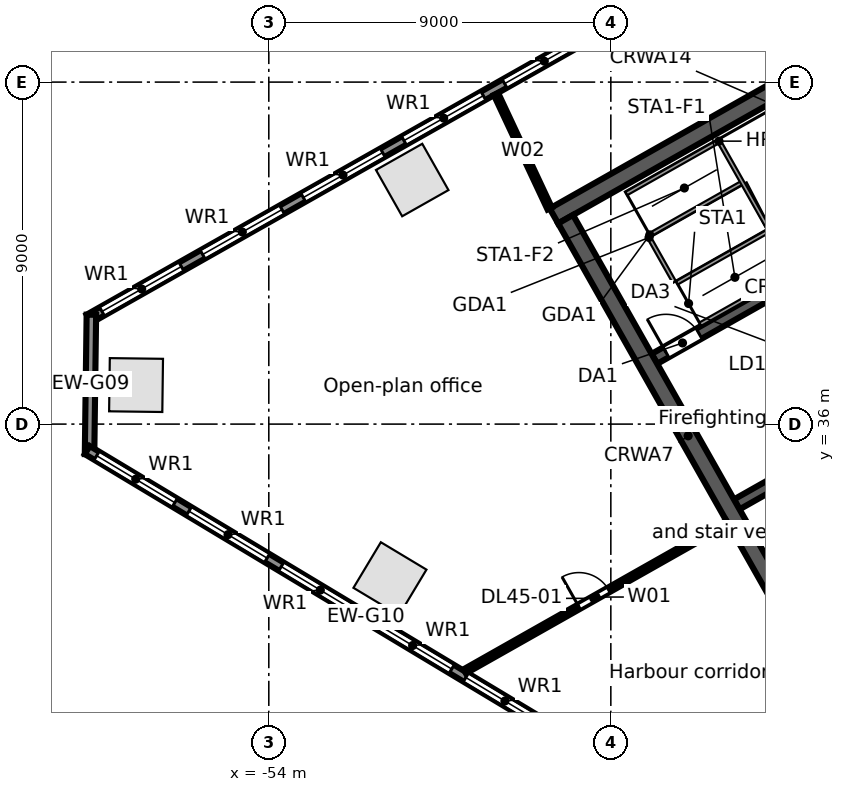
"""IFC4 building model, lengths in metres.
Left out: names, types, materials, properties, quantities, classifications, styles, units other than length and angle.
Written with IfcOpenShell. Run it as: python <this file> out.ifc"""

import sys

from ifc_helpers import new_model, si_unit, direction, frame, frame_2d, origin, origin_2d, place, context, subcontext, project, spatial, rectangle, extrude, element, fill, save


model = new_model("IFC4")
c1 = context("Model", 3, precision=1e-05, world=origin(), true_north=direction((0.0, 1.0)))
c2 = subcontext(c1, "Body", "Model", "MODEL_VIEW")
j1 = project(units=[si_unit("LENGTHUNIT", "METRE"), si_unit("PLANEANGLEUNIT", "RADIAN")], contexts=[c1])
p1 = place(None, origin())
s1 = spatial("IfcSite", under=j1, at=p1, CompositionType="ELEMENT")
p2 = place(p1, origin())
s2 = spatial("IfcBuilding", under=s1, at=p2, CompositionType="ELEMENT")
p3 = place(p2, frame((0.0, 0.0, 211.4)))
s3 = spatial("IfcBuildingStorey", under=s2, at=p3, CompositionType="ELEMENT", Elevation=211.4)
for number, where, z_axis, x_axis in (
    (1, (-50.226, 42.423, 0.0), (0.0, 0.0, 1.0), (-0.87, -0.492, 0.0)),
    (2, (-57.493, 37.027, 0.0), (0.0, 0.0, 1.0), (-0.013, -1.0, 0.0)),
    (3, (-50.812, 31.931, 0.0), (0.0, 0.0, 1.0), (0.857, -0.515, 0.0)),
):
    element("IfcColumn", number, at=place(p3, frame(where, z_axis=z_axis, x_axis=x_axis)), inside=s3, PredefinedType="COLUMN", context=c2, shape_type="SweptSolid", body=[
        extrude(rectangle(XDim=1.4, YDim=1.4, at=origin_2d()), origin(), (0.0, 0.0, 1.0), 3.9),
    ])
p4 = place(p3, frame((-58.732, 38.771, 0.0), z_axis=(0.0, 0.0, 1.0), x_axis=(0.870354824205, 0.492425100887, 0.0)))
e4 = element("IfcWall", 4, at=p4, inside=s3, PredefinedType="STANDARD", context=c2, shape_type="SweptSolid", body=[
    extrude(rectangle(XDim=64.006, YDim=0.25, at=frame_2d((32.003, 0.0))), origin(), (0.0, 0.0, 1.0), 3.62),
])
p5 = place(p4, frame((61.259, 0.0, 0.8)))
e5 = element("IfcOpeningElement", 5, at=p5, cuts=e4, PredefinedType="OPENING", context=c2, shape_type="SweptSolid", body=[
    extrude(rectangle(XDim=2.4, YDim=2.2, at=frame_2d((1.2, 1.1))), frame((0.0, 0.135, 0.0), z_axis=(0.0, -1.0, 0.0), x_axis=(1.0, 0.0, 0.0)), (0.0, 0.0, 1.0), 0.27),
])
p6 = place(p4, frame((58.216, 0.0, 0.8)))
e6 = element("IfcOpeningElement", 6, at=p6, cuts=e4, PredefinedType="OPENING", context=c2, shape_type="SweptSolid", body=[
    extrude(rectangle(XDim=2.4, YDim=2.2, at=frame_2d((1.2, 1.1))), frame((0.0, 0.135, 0.0), z_axis=(0.0, -1.0, 0.0), x_axis=(1.0, 0.0, 0.0)), (0.0, 0.0, 1.0), 0.27),
])
p7 = place(p4, frame((55.173, 0.0, 0.8)))
e7 = element("IfcOpeningElement", 7, at=p7, cuts=e4, PredefinedType="OPENING", context=c2, shape_type="SweptSolid", body=[
    extrude(rectangle(XDim=2.4, YDim=2.2, at=frame_2d((1.2, 1.1))), frame((0.0, 0.135, 0.0), z_axis=(0.0, -1.0, 0.0), x_axis=(1.0, 0.0, 0.0)), (0.0, 0.0, 1.0), 0.27),
])
p8 = place(p4, frame((52.129, 0.0, 0.8)))
e8 = element("IfcOpeningElement", 8, at=p8, cuts=e4, PredefinedType="OPENING", context=c2, shape_type="SweptSolid", body=[
    extrude(rectangle(XDim=2.4, YDim=2.2, at=frame_2d((1.2, 1.1))), frame((0.0, 0.135, 0.0), z_axis=(0.0, -1.0, 0.0), x_axis=(1.0, 0.0, 0.0)), (0.0, 0.0, 1.0), 0.27),
])
p9 = place(p4, frame((49.086, 0.0, 0.8)))
e9 = element("IfcOpeningElement", 9, at=p9, cuts=e4, PredefinedType="OPENING", context=c2, shape_type="SweptSolid", body=[
    extrude(rectangle(XDim=2.4, YDim=2.2, at=frame_2d((1.2, 1.1))), frame((0.0, 0.135, 0.0), z_axis=(0.0, -1.0, 0.0), x_axis=(1.0, 0.0, 0.0)), (0.0, 0.0, 1.0), 0.27),
])
p10 = place(p4, frame((46.043, 0.0, 0.8)))
e10 = element("IfcOpeningElement", 10, at=p10, cuts=e4, PredefinedType="OPENING", context=c2, shape_type="SweptSolid", body=[
    extrude(rectangle(XDim=2.4, YDim=2.2, at=frame_2d((1.2, 1.1))), frame((0.0, 0.135, 0.0), z_axis=(0.0, -1.0, 0.0), x_axis=(1.0, 0.0, 0.0)), (0.0, 0.0, 1.0), 0.27),
])
p11 = place(p4, frame((43.0, 0.0, 0.8)))
e11 = element("IfcOpeningElement", 11, at=p11, cuts=e4, PredefinedType="OPENING", context=c2, shape_type="SweptSolid", body=[
    extrude(rectangle(XDim=2.4, YDim=2.2, at=frame_2d((1.2, 1.1))), frame((0.0, 0.135, 0.0), z_axis=(0.0, -1.0, 0.0), x_axis=(1.0, 0.0, 0.0)), (0.0, 0.0, 1.0), 0.27),
])
p12 = place(p4, frame((39.956, 0.0, 0.8)))
e12 = element("IfcOpeningElement", 12, at=p12, cuts=e4, PredefinedType="OPENING", context=c2, shape_type="SweptSolid", body=[
    extrude(rectangle(XDim=2.4, YDim=2.2, at=frame_2d((1.2, 1.1))), frame((0.0, 0.135, 0.0), z_axis=(0.0, -1.0, 0.0), x_axis=(1.0, 0.0, 0.0)), (0.0, 0.0, 1.0), 0.27),
])
p13 = place(p4, frame((36.913, 0.0, 0.8)))
e13 = element("IfcOpeningElement", 13, at=p13, cuts=e4, PredefinedType="OPENING", context=c2, shape_type="SweptSolid", body=[
    extrude(rectangle(XDim=2.4, YDim=2.2, at=frame_2d((1.2, 1.1))), frame((0.0, 0.135, 0.0), z_axis=(0.0, -1.0, 0.0), x_axis=(1.0, 0.0, 0.0)), (0.0, 0.0, 1.0), 0.27),
])
p14 = place(p4, frame((33.87, 0.0, 0.8)))
e14 = element("IfcOpeningElement", 14, at=p14, cuts=e4, PredefinedType="OPENING", context=c2, shape_type="SweptSolid", body=[
    extrude(rectangle(XDim=2.4, YDim=2.2, at=frame_2d((1.2, 1.1))), frame((0.0, 0.135, 0.0), z_axis=(0.0, -1.0, 0.0), x_axis=(1.0, 0.0, 0.0)), (0.0, 0.0, 1.0), 0.27),
])
p15 = place(p4, frame((30.826, 0.0, 0.8)))
e15 = element("IfcOpeningElement", 15, at=p15, cuts=e4, PredefinedType="OPENING", context=c2, shape_type="SweptSolid", body=[
    extrude(rectangle(XDim=2.4, YDim=2.2, at=frame_2d((1.2, 1.1))), frame((0.0, 0.135, 0.0), z_axis=(0.0, -1.0, 0.0), x_axis=(1.0, 0.0, 0.0)), (0.0, 0.0, 1.0), 0.27),
])
p16 = place(p4, frame((27.783, 0.0, 0.8)))
e16 = element("IfcOpeningElement", 16, at=p16, cuts=e4, PredefinedType="OPENING", context=c2, shape_type="SweptSolid", body=[
    extrude(rectangle(XDim=2.4, YDim=2.2, at=frame_2d((1.2, 1.1))), frame((0.0, 0.135, 0.0), z_axis=(0.0, -1.0, 0.0), x_axis=(1.0, 0.0, 0.0)), (0.0, 0.0, 1.0), 0.27),
])
p17 = place(p4, frame((24.74, 0.0, 0.8)))
e17 = element("IfcOpeningElement", 17, at=p17, cuts=e4, PredefinedType="OPENING", context=c2, shape_type="SweptSolid", body=[
    extrude(rectangle(XDim=2.4, YDim=2.2, at=frame_2d((1.2, 1.1))), frame((0.0, 0.135, 0.0), z_axis=(0.0, -1.0, 0.0), x_axis=(1.0, 0.0, 0.0)), (0.0, 0.0, 1.0), 0.27),
])
p18 = place(p4, frame((21.696, 0.0, 0.8)))
e18 = element("IfcOpeningElement", 18, at=p18, cuts=e4, PredefinedType="OPENING", context=c2, shape_type="SweptSolid", body=[
    extrude(rectangle(XDim=2.4, YDim=2.2, at=frame_2d((1.2, 1.1))), frame((0.0, 0.135, 0.0), z_axis=(0.0, -1.0, 0.0), x_axis=(1.0, 0.0, 0.0)), (0.0, 0.0, 1.0), 0.27),
])
p19 = place(p4, frame((18.653, 0.0, 0.8)))
e19 = element("IfcOpeningElement", 19, at=p19, cuts=e4, PredefinedType="OPENING", context=c2, shape_type="SweptSolid", body=[
    extrude(rectangle(XDim=2.4, YDim=2.2, at=frame_2d((1.2, 1.1))), frame((0.0, 0.135, 0.0), z_axis=(0.0, -1.0, 0.0), x_axis=(1.0, 0.0, 0.0)), (0.0, 0.0, 1.0), 0.27),
])
p20 = place(p4, frame((15.61, 0.0, 0.8)))
e20 = element("IfcOpeningElement", 20, at=p20, cuts=e4, PredefinedType="OPENING", context=c2, shape_type="SweptSolid", body=[
    extrude(rectangle(XDim=2.4, YDim=2.2, at=frame_2d((1.2, 1.1))), frame((0.0, 0.135, 0.0), z_axis=(0.0, -1.0, 0.0), x_axis=(1.0, 0.0, 0.0)), (0.0, 0.0, 1.0), 0.27),
])
p21 = place(p4, frame((12.567, 0.0, 0.8)))
e21 = element("IfcOpeningElement", 21, at=p21, cuts=e4, PredefinedType="OPENING", context=c2, shape_type="SweptSolid", body=[
    extrude(rectangle(XDim=2.4, YDim=2.2, at=frame_2d((1.2, 1.1))), frame((0.0, 0.135, 0.0), z_axis=(0.0, -1.0, 0.0), x_axis=(1.0, 0.0, 0.0)), (0.0, 0.0, 1.0), 0.27),
])
p22 = place(p4, frame((9.523, 0.0, 0.8)))
e22 = element("IfcOpeningElement", 22, at=p22, cuts=e4, PredefinedType="OPENING", context=c2, shape_type="SweptSolid", body=[
    extrude(rectangle(XDim=2.4, YDim=2.2, at=frame_2d((1.2, 1.1))), frame((0.0, 0.135, 0.0), z_axis=(0.0, -1.0, 0.0), x_axis=(1.0, 0.0, 0.0)), (0.0, 0.0, 1.0), 0.27),
])
p23 = place(p4, frame((6.48, 0.0, 0.8)))
e23 = element("IfcOpeningElement", 23, at=p23, cuts=e4, PredefinedType="OPENING", context=c2, shape_type="SweptSolid", body=[
    extrude(rectangle(XDim=2.4, YDim=2.2, at=frame_2d((1.2, 1.1))), frame((0.0, 0.135, 0.0), z_axis=(0.0, -1.0, 0.0), x_axis=(1.0, 0.0, 0.0)), (0.0, 0.0, 1.0), 0.27),
])
p24 = place(p4, frame((3.437, 0.0, 0.8)))
e24 = element("IfcOpeningElement", 24, at=p24, cuts=e4, PredefinedType="OPENING", context=c2, shape_type="SweptSolid", body=[
    extrude(rectangle(XDim=2.4, YDim=2.2, at=frame_2d((1.2, 1.1))), frame((0.0, 0.135, 0.0), z_axis=(0.0, -1.0, 0.0), x_axis=(1.0, 0.0, 0.0)), (0.0, 0.0, 1.0), 0.27),
])
p25 = place(p4, frame((0.393, 0.0, 0.8)))
e25 = element("IfcOpeningElement", 25, at=p25, cuts=e4, PredefinedType="OPENING", context=c2, shape_type="SweptSolid", body=[
    extrude(rectangle(XDim=2.4, YDim=2.2, at=frame_2d((1.2, 1.1))), frame((0.0, 0.135, 0.0), z_axis=(0.0, -1.0, 0.0), x_axis=(1.0, 0.0, 0.0)), (0.0, 0.0, 1.0), 0.27),
])
p26 = place(p3, frame((-58.717, 35.208, 0.0), z_axis=(0.0, 0.0, 1.0), x_axis=(0.01310512158, 0.999914124207, 0.0)))
e26 = element("IfcWall", 26, at=p26, inside=s3, PredefinedType="STANDARD", context=c2, shape_type="SweptSolid", body=[
    extrude(rectangle(XDim=3.67, YDim=0.25, at=frame_2d((1.835, 0.0))), origin(), (0.0, 0.0, 1.0), 3.62),
])
p27 = place(p3, frame((-44.115, 26.507, 0.0), z_axis=(0.0, 0.0, 1.0), x_axis=(-0.857166583633, 0.515039268311, 0.0)))
e27 = element("IfcWall", 27, at=p27, inside=s3, PredefinedType="STANDARD", context=c2, shape_type="SweptSolid", body=[
    extrude(rectangle(XDim=17.106, YDim=0.25, at=frame_2d((8.553, 0.0))), origin(), (0.0, 0.0, 1.0), 3.62),
])
p28 = place(p27, frame((14.417, 0.0, 0.8)))
e28 = element("IfcOpeningElement", 28, at=p28, cuts=e27, PredefinedType="OPENING", context=c2, shape_type="SweptSolid", body=[
    extrude(rectangle(XDim=2.4, YDim=2.2, at=frame_2d((1.2, 1.1))), frame((0.0, 0.135, 0.0), z_axis=(0.0, -1.0, 0.0), x_axis=(1.0, 0.0, 0.0)), (0.0, 0.0, 1.0), 0.27),
])
p29 = place(p27, frame((11.584, 0.0, 0.8)))
e29 = element("IfcOpeningElement", 29, at=p29, cuts=e27, PredefinedType="OPENING", context=c2, shape_type="SweptSolid", body=[
    extrude(rectangle(XDim=2.4, YDim=2.2, at=frame_2d((1.2, 1.1))), frame((0.0, 0.135, 0.0), z_axis=(0.0, -1.0, 0.0), x_axis=(1.0, 0.0, 0.0)), (0.0, 0.0, 1.0), 0.27),
])
p30 = place(p27, frame((8.75, 0.0, 0.8)))
e30 = element("IfcOpeningElement", 30, at=p30, cuts=e27, PredefinedType="OPENING", context=c2, shape_type="SweptSolid", body=[
    extrude(rectangle(XDim=2.4, YDim=2.2, at=frame_2d((1.2, 1.1))), frame((0.0, 0.135, 0.0), z_axis=(0.0, -1.0, 0.0), x_axis=(1.0, 0.0, 0.0)), (0.0, 0.0, 1.0), 0.27),
])
p31 = place(p27, frame((5.917, 0.0, 0.8)))
e31 = element("IfcOpeningElement", 31, at=p31, cuts=e27, PredefinedType="OPENING", context=c2, shape_type="SweptSolid", body=[
    extrude(rectangle(XDim=2.4, YDim=2.2, at=frame_2d((1.2, 1.1))), frame((0.0, 0.135, 0.0), z_axis=(0.0, -1.0, 0.0), x_axis=(1.0, 0.0, 0.0)), (0.0, 0.0, 1.0), 0.27),
])
p32 = place(p27, frame((3.084, 0.0, 0.8)))
e32 = element("IfcOpeningElement", 32, at=p32, cuts=e27, PredefinedType="OPENING", context=c2, shape_type="SweptSolid", body=[
    extrude(rectangle(XDim=2.4, YDim=2.2, at=frame_2d((1.2, 1.1))), frame((0.0, 0.135, 0.0), z_axis=(0.0, -1.0, 0.0), x_axis=(1.0, 0.0, 0.0)), (0.0, 0.0, 1.0), 0.27),
])
p33 = place(p27, frame((0.25, 0.0, 0.8)))
e33 = element("IfcOpeningElement", 33, at=p33, cuts=e27, PredefinedType="OPENING", context=c2, shape_type="SweptSolid", body=[
    extrude(rectangle(XDim=2.4, YDim=2.2, at=frame_2d((1.2, 1.1))), frame((0.0, 0.135, 0.0), z_axis=(0.0, -1.0, 0.0), x_axis=(1.0, 0.0, 0.0)), (0.0, 0.0, 1.0), 0.27),
])
p34 = place(p3, frame((-41.687, 33.887, 0.0), z_axis=(0.0, 0.0, 1.0), x_axis=(0.870355736587, 0.49242348826, 0.0)))
e34 = element("IfcWall", 34, at=p34, inside=s3, PredefinedType="SOLIDWALL", context=c2, shape_type="SweptSolid", body=[
    extrude(rectangle(XDim=6.15, YDim=0.3, at=frame_2d((3.075, 0.0))), origin(), (0.0, 0.0, 1.0), 3.62),
])
p35 = place(p34, frame((1.25, 0.0, 0.0)))
e35 = element("IfcOpeningElement", 35, at=p35, cuts=e34, PredefinedType="OPENING", context=c2, shape_type="SweptSolid", body=[
    extrude(rectangle(XDim=1.1, YDim=2.1, at=frame_2d((0.55, 1.05))), frame((0.0, 0.16, 0.0), z_axis=(0.0, -1.0, 0.0), x_axis=(1.0, 0.0, 0.0)), (0.0, 0.0, 1.0), 0.32),
])
p36 = place(p34, frame((4.4, 0.0, 0.0)))
e36 = element("IfcOpeningElement", 36, at=p36, cuts=e34, PredefinedType="OPENING", context=c2, shape_type="SweptSolid", body=[
    extrude(rectangle(XDim=1.1, YDim=2.1, at=frame_2d((0.55, 1.05))), frame((0.0, 0.16, 0.0), z_axis=(0.0, -1.0, 0.0), x_axis=(1.0, 0.0, 0.0)), (0.0, 0.0, 1.0), 0.32),
])
p37 = place(p3, frame((-43.853, 37.717, 0.0), z_axis=(0.0, 0.0, 1.0), x_axis=(0.870360409231, 0.492415229297, 0.0)))
e37 = element("IfcWall", 37, at=p37, inside=s3, PredefinedType="SOLIDWALL", context=c2, shape_type="SweptSolid", body=[
    extrude(rectangle(XDim=7.55, YDim=0.3, at=frame_2d((3.775, 0.0))), origin(), (0.0, 0.0, 1.0), 3.62),
])
p38 = place(p37, frame((0.35, 0.0, 0.0)))
e38 = element("IfcOpeningElement", 38, at=p38, cuts=e37, PredefinedType="OPENING", context=c2, shape_type="SweptSolid", body=[
    extrude(rectangle(XDim=1.0, YDim=2.1, at=frame_2d((0.5, 1.05))), frame((0.0, 0.16, 0.0), z_axis=(0.0, -1.0, 0.0), x_axis=(1.0, 0.0, 0.0)), (0.0, 0.0, 1.0), 0.32),
])
p39 = place(p3, frame((-46.498, 41.477, 0.0), z_axis=(0.0, 0.0, 1.0), x_axis=(0.870359753402, 0.492416388494, 0.0)))
e39 = element("IfcWall", 39, at=p39, inside=s3, PredefinedType="SOLIDWALL", context=c2, shape_type="SweptSolid", body=[
    extrude(rectangle(XDim=17.0, YDim=0.45, at=frame_2d((8.5, 0.0))), origin(), (0.0, 0.0, 1.0), 3.62),
])
p40 = place(p3, frame((-46.191, 41.392, 0.0), z_axis=(0.0, 0.0, 1.0), x_axis=(0.492421378713, -0.870356930107, 0.0)))
e40 = element("IfcWall", 40, at=p40, inside=s3, PredefinedType="SOLIDWALL", context=c2, shape_type="SweptSolid", body=[
    extrude(rectangle(XDim=13.1, YDim=0.45, at=frame_2d((6.55, 0.0))), origin(), (0.0, 0.0, 1.0), 3.62),
])
p41 = place(p3, frame((-48.843, 29.494, 0.0), z_axis=(0.0, 0.0, 1.0), x_axis=(0.870384139606, 0.492373282705, 0.0)))
e41 = element("IfcWall", 41, at=p41, inside=s3, PredefinedType="PARTITIONING", context=c2, shape_type="SweptSolid", body=[
    extrude(rectangle(XDim=7.941, YDim=0.125, at=frame_2d((3.971, 0.0))), origin(), (0.0, 0.0, 1.0), 2.9),
])
p42 = place(p41, frame((3.45, 0.0, 0.0)))
e42 = element("IfcOpeningElement", 42, at=p42, cuts=e41, PredefinedType="OPENING", context=c2, shape_type="SweptSolid", body=[
    extrude(rectangle(XDim=0.9, YDim=2.1, at=frame_2d((0.45, 1.05))), frame((0.0, 0.073, 0.0), z_axis=(0.0, -1.0, 0.0), x_axis=(1.0, 0.0, 0.0)), (0.0, 0.0, 1.0), 0.145),
])
p43 = place(p3, frame((-48.022, 44.687, 0.0), z_axis=(0.0, 0.0, 1.0), x_axis=(0.424510917438, -0.905422818895, 0.0)))
e43 = element("IfcWall", 43, at=p43, inside=s3, PredefinedType="PARTITIONING", context=c2, shape_type="SweptSolid", body=[
    extrude(rectangle(XDim=3.329, YDim=0.125, at=frame_2d((1.665, 0.0))), origin(), (0.0, 0.0, 1.0), 2.988),
])
p44 = place(p21, origin())
e44 = element("IfcWindow", 44, at=p44, inside=s3, PartitioningType="SINGLE_PANEL", PredefinedType="WINDOW", context=c2, shape_type="SweptSolid", body=[
    extrude(rectangle(XDim=2.4, YDim=2.2, at=frame_2d((1.2, 1.1))), frame((0.0, 0.03, 0.0), z_axis=(0.0, -1.0, 0.0), x_axis=(1.0, 0.0, 0.0)), (0.0, 0.0, 1.0), 0.06),
])
fill(e21, e44)
p45 = place(p22, origin())
e45 = element("IfcWindow", 45, at=p45, inside=s3, PartitioningType="SINGLE_PANEL", PredefinedType="WINDOW", context=c2, shape_type="SweptSolid", body=[
    extrude(rectangle(XDim=2.4, YDim=2.2, at=frame_2d((1.2, 1.1))), frame((0.0, 0.03, 0.0), z_axis=(0.0, -1.0, 0.0), x_axis=(1.0, 0.0, 0.0)), (0.0, 0.0, 1.0), 0.06),
])
fill(e22, e45)
p46 = place(p23, origin())
e46 = element("IfcWindow", 46, at=p46, inside=s3, PartitioningType="SINGLE_PANEL", PredefinedType="WINDOW", context=c2, shape_type="SweptSolid", body=[
    extrude(rectangle(XDim=2.4, YDim=2.2, at=frame_2d((1.2, 1.1))), frame((0.0, 0.03, 0.0), z_axis=(0.0, -1.0, 0.0), x_axis=(1.0, 0.0, 0.0)), (0.0, 0.0, 1.0), 0.06),
])
fill(e23, e46)
p47 = place(p24, origin())
e47 = element("IfcWindow", 47, at=p47, inside=s3, PartitioningType="SINGLE_PANEL", PredefinedType="WINDOW", context=c2, shape_type="SweptSolid", body=[
    extrude(rectangle(XDim=2.4, YDim=2.2, at=frame_2d((1.2, 1.1))), frame((0.0, 0.03, 0.0), z_axis=(0.0, -1.0, 0.0), x_axis=(1.0, 0.0, 0.0)), (0.0, 0.0, 1.0), 0.06),
])
fill(e24, e47)
p48 = place(p25, origin())
e48 = element("IfcWindow", 48, at=p48, inside=s3, PartitioningType="SINGLE_PANEL", PredefinedType="WINDOW", context=c2, shape_type="SweptSolid", body=[
    extrude(rectangle(XDim=2.4, YDim=2.2, at=frame_2d((1.2, 1.1))), frame((0.0, 0.03, 0.0), z_axis=(0.0, -1.0, 0.0), x_axis=(1.0, 0.0, 0.0)), (0.0, 0.0, 1.0), 0.06),
])
fill(e25, e48)
p49 = place(p28, origin())
e49 = element("IfcWindow", 49, at=p49, inside=s3, PartitioningType="SINGLE_PANEL", PredefinedType="WINDOW", context=c2, shape_type="SweptSolid", body=[
    extrude(rectangle(XDim=2.4, YDim=2.2, at=frame_2d((1.2, 1.1))), frame((0.0, 0.03, 0.0), z_axis=(0.0, -1.0, 0.0), x_axis=(1.0, 0.0, 0.0)), (0.0, 0.0, 1.0), 0.06),
])
fill(e28, e49)
p50 = place(p29, origin())
e50 = element("IfcWindow", 50, at=p50, inside=s3, PartitioningType="SINGLE_PANEL", PredefinedType="WINDOW", context=c2, shape_type="SweptSolid", body=[
    extrude(rectangle(XDim=2.4, YDim=2.2, at=frame_2d((1.2, 1.1))), frame((0.0, 0.03, 0.0), z_axis=(0.0, -1.0, 0.0), x_axis=(1.0, 0.0, 0.0)), (0.0, 0.0, 1.0), 0.06),
])
fill(e29, e50)
p51 = place(p30, origin())
e51 = element("IfcWindow", 51, at=p51, inside=s3, PartitioningType="SINGLE_PANEL", PredefinedType="WINDOW", context=c2, shape_type="SweptSolid", body=[
    extrude(rectangle(XDim=2.4, YDim=2.2, at=frame_2d((1.2, 1.1))), frame((0.0, 0.03, 0.0), z_axis=(0.0, -1.0, 0.0), x_axis=(1.0, 0.0, 0.0)), (0.0, 0.0, 1.0), 0.06),
])
fill(e30, e51)
p52 = place(p31, origin())
e52 = element("IfcWindow", 52, at=p52, inside=s3, PartitioningType="SINGLE_PANEL", PredefinedType="WINDOW", context=c2, shape_type="SweptSolid", body=[
    extrude(rectangle(XDim=2.4, YDim=2.2, at=frame_2d((1.2, 1.1))), frame((0.0, 0.03, 0.0), z_axis=(0.0, -1.0, 0.0), x_axis=(1.0, 0.0, 0.0)), (0.0, 0.0, 1.0), 0.06),
])
fill(e31, e52)
p53 = place(p32, origin())
e53 = element("IfcWindow", 53, at=p53, inside=s3, PartitioningType="SINGLE_PANEL", PredefinedType="WINDOW", context=c2, shape_type="SweptSolid", body=[
    extrude(rectangle(XDim=2.4, YDim=2.2, at=frame_2d((1.2, 1.1))), frame((0.0, 0.03, 0.0), z_axis=(0.0, -1.0, 0.0), x_axis=(1.0, 0.0, 0.0)), (0.0, 0.0, 1.0), 0.06),
])
fill(e32, e53)
p54 = place(p38, origin())
e54 = element("IfcDoor", 54, at=p54, inside=s3, OperationType="SINGLE_SWING_LEFT", PredefinedType="DOOR", context=c2, shape_type="SweptSolid", body=[
    extrude(rectangle(XDim=1.0, YDim=2.1, at=frame_2d((0.5, 1.05))), frame((0.0, 0.025, 0.0), z_axis=(0.0, -1.0, 0.0), x_axis=(1.0, 0.0, 0.0)), (0.0, 0.0, 1.0), 0.05),
])
fill(e38, e54)
p55 = place(p42, origin())
e55 = element("IfcDoor", 55, at=p55, inside=s3, OperationType="SINGLE_SWING_LEFT", PredefinedType="DOOR", context=c2, shape_type="SweptSolid", body=[
    extrude(rectangle(XDim=0.9, YDim=2.1, at=frame_2d((0.45, 1.05))), frame((0.0, 0.025, 0.0), z_axis=(0.0, -1.0, 0.0), x_axis=(1.0, 0.0, 0.0)), (0.0, 0.0, 1.0), 0.05),
])
fill(e42, e55)
save(model, sys.argv[1])
